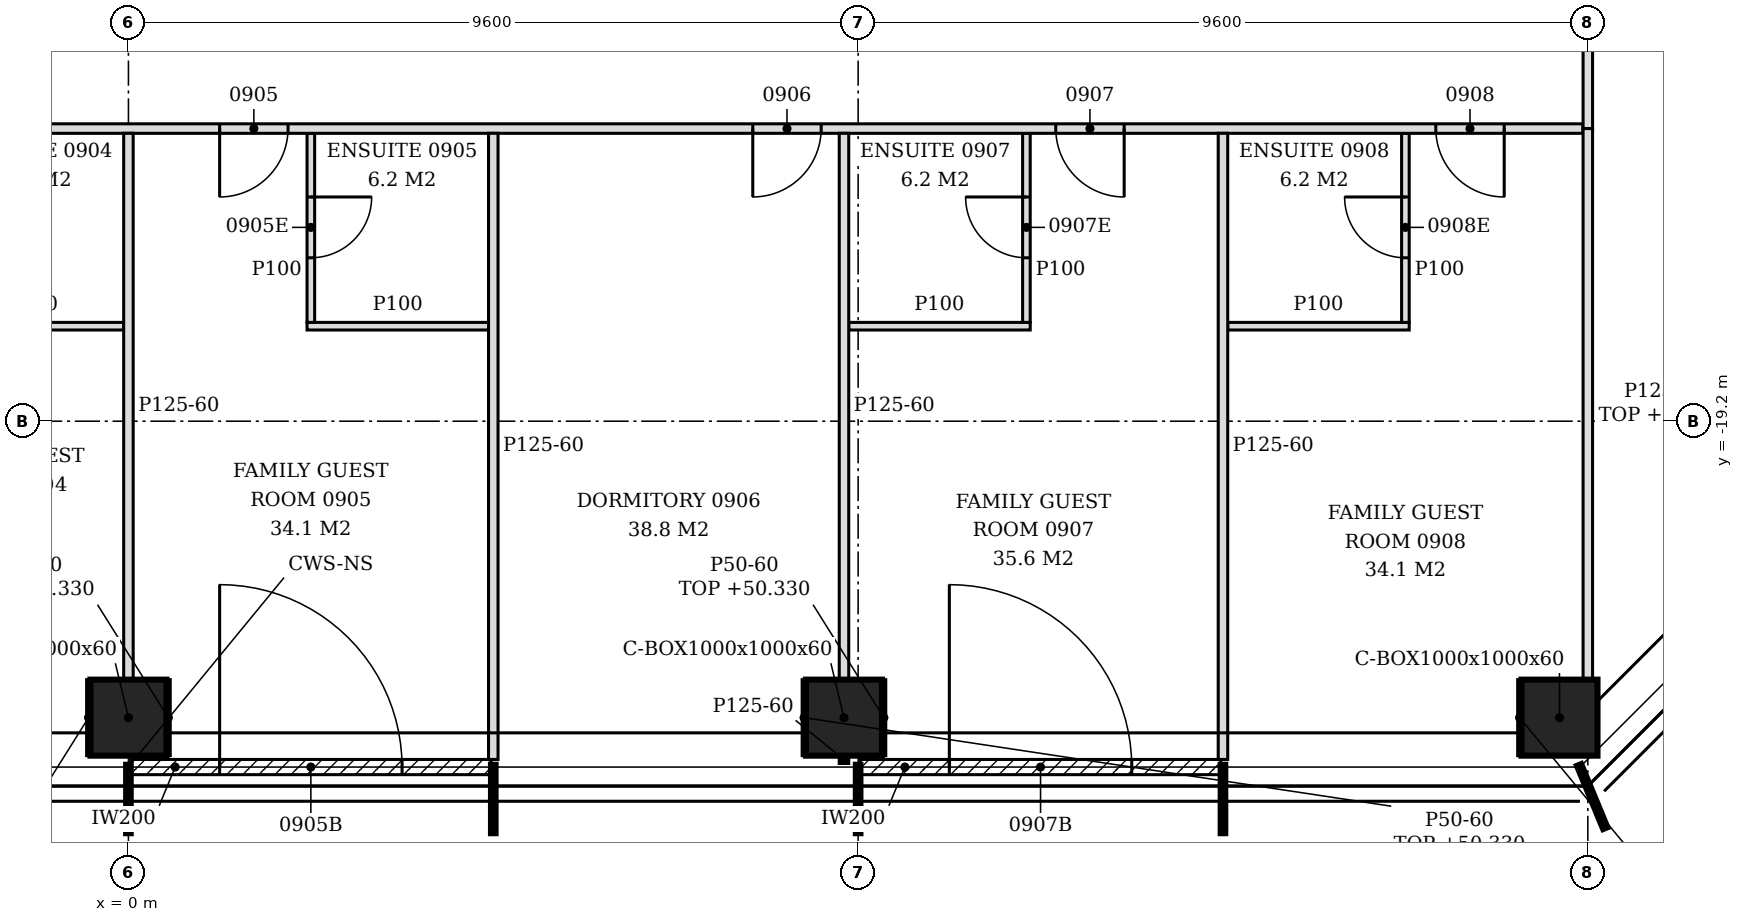
"""IFC4 building model, lengths in metres.
Left out: names, types, materials, properties, quantities, classifications, styles, units other than length and angle.
Written with IfcOpenShell. Run it as: python <this file> out.ifc"""

import sys

from ifc_helpers import new_model, si_unit, direction, frame, frame_2d, origin, origin_2d, place, context, subcontext, project, spatial, polyline, rectangle, hollow_rectangle, outline, extrude, element, fill, save


model = new_model("IFC4")
c1 = context("Model", 3, precision=1e-05, world=origin(), true_north=direction((0.0, 1.0)))
c2 = subcontext(c1, "Body", "Model", "MODEL_VIEW")
j1 = project(units=[si_unit("LENGTHUNIT", "METRE"), si_unit("PLANEANGLEUNIT", "RADIAN")], contexts=[c1])
p1 = place(None, origin())
s1 = spatial("IfcSite", under=j1, at=p1, CompositionType="ELEMENT")
p2 = place(p1, origin())
s2 = spatial("IfcBuilding", under=s1, at=p2, CompositionType="ELEMENT")
p3 = place(p2, frame((0.0, 0.0, 47.4)))
s3 = spatial("IfcBuildingStorey", under=s2, at=p3, CompositionType="ELEMENT", Elevation=47.4)
for number, where, z_axis, x_axis in (
    (1, (0.0, -23.1, -0.15), (0.0, 0.0, 1.0), (1.0, 0.0, 0.0)),
    (2, (9.414, -23.1, -0.15), (0.0, 0.0, 1.0), (1.0, 0.0, 0.0)),
    (3, (18.827, -23.1, -0.15), (0.0, 0.0, 1.0), (1.0, 0.0, 0.0)),
):
    element("IfcColumn", number, at=place(p3, frame(where, z_axis=z_axis, x_axis=x_axis)), inside=s3, PredefinedType="COLUMN", context=c2, shape_type="SweptSolid", body=[
        extrude(hollow_rectangle(XDim=1.0, YDim=1.0, WallThickness=0.06, at=origin_2d()), origin(), (0.0, 0.0, 1.0), 3.6),
    ])
p4 = place(p3, frame((0.03, -23.75, 0.0), z_axis=(0.0, 0.0, 1.0), x_axis=(1.0, 0.0, 0.0)))
e4 = element("IfcWall", 4, at=p4, inside=s3, PredefinedType="NOTDEFINED", context=c2, shape_type="SweptSolid", body=[
    extrude(rectangle(XDim=4.74, YDim=0.2, at=frame_2d((2.37, 0.0))), origin(), (0.0, 0.0, 1.0), 3.45),
])
p5 = place(p4, frame((1.17, 0.0, 0.0)))
e5 = element("IfcOpeningElement", 5, at=p5, cuts=e4, PredefinedType="OPENING", context=c2, shape_type="SweptSolid", body=[
    extrude(rectangle(XDim=2.4, YDim=2.4, at=frame_2d((1.2, 1.2))), frame((0.0, 0.11, 0.0), z_axis=(0.0, -1.0, 0.0), x_axis=(1.0, 0.0, 0.0)), (0.0, 0.0, 1.0), 0.22),
])
p6 = place(p3, frame((9.63, -23.75, 0.0), z_axis=(0.0, 0.0, 1.0), x_axis=(1.0, 0.0, 0.0)))
e6 = element("IfcWall", 6, at=p6, inside=s3, PredefinedType="NOTDEFINED", context=c2, shape_type="SweptSolid", body=[
    extrude(rectangle(XDim=4.74, YDim=0.2, at=frame_2d((2.37, 0.0))), origin(), (0.0, 0.0, 1.0), 3.45),
])
p7 = place(p6, frame((1.17, 0.0, 0.0)))
e7 = element("IfcOpeningElement", 7, at=p7, cuts=e6, PredefinedType="OPENING", context=c2, shape_type="SweptSolid", body=[
    extrude(rectangle(XDim=2.4, YDim=2.4, at=frame_2d((1.2, 1.2))), frame((0.0, 0.11, 0.0), z_axis=(0.0, -1.0, 0.0), x_axis=(1.0, 0.0, 0.0)), (0.0, 0.0, 1.0), 0.22),
])
p8 = place(p3, frame((4.8, -23.65, 0.0), z_axis=(0.0, 0.0, 1.0), x_axis=(0.0, 1.0, 0.0)))
e8 = element("IfcWall", 8, at=p8, inside=s3, PredefinedType="PARTITIONING", context=c2, shape_type="SweptSolid", body=[
    extrude(outline(polyline([(0.0, 0.0), (8.237, 0.0), (8.238, 3.45), (4.555, 3.45), (4.553, 2.88), (4.345, 2.88), (4.343, 3.45), (0.7, 3.45), (0.698, 2.93), (0.4, 2.93), (0.398, 3.45), (0.0, 3.45), (0.0, 0.0)])), frame((0.0, 0.062, 0.0), z_axis=(0.0, -1.0, 0.0), x_axis=(1.0, 0.0, 0.0)), (0.0, 0.0, 1.0), 0.125),
])
p9 = place(p3, frame((9.414, -23.703, 0.0), z_axis=(0.0, 0.0, 1.0), x_axis=(0.0, 1.0, 0.0)))
e9 = element("IfcWall", 9, at=p9, inside=s3, PredefinedType="PARTITIONING", context=c2, shape_type="SweptSolid", body=[
    extrude(rectangle(XDim=0.103, YDim=0.125, at=frame_2d((0.051, 0.0))), origin(), (0.0, 0.0, 1.0), 3.45),
])
p10 = place(p3, frame((14.4, -23.65, 0.0), z_axis=(0.0, 0.0, 1.0), x_axis=(0.0, 1.0, 0.0)))
e10 = element("IfcWall", 10, at=p10, inside=s3, PredefinedType="PARTITIONING", context=c2, shape_type="SweptSolid", body=[
    extrude(outline(polyline([(0.0, 0.0), (8.237, 0.0), (8.238, 3.45), (4.555, 3.45), (4.553, 2.88), (4.345, 2.88), (4.343, 3.45), (0.7, 3.45), (0.698, 2.93), (0.4, 2.93), (0.398, 3.45), (0.0, 3.45), (0.0, 0.0)])), frame((0.0, 0.062, 0.0), z_axis=(0.0, -1.0, 0.0), x_axis=(1.0, 0.0, 0.0)), (0.0, 0.0, 1.0), 0.125),
])
for number, where, z_axis, x_axis in (
    (11, (0.0, -22.6, 0.0), (0.0, 0.0, 1.0), (0.0, 1.0, 0.0)),
    (12, (9.414, -22.6, 0.0), (0.0, 0.0, 1.0), (0.0, 1.0, 0.0)),
):
    element("IfcWall", number, at=place(p3, frame(where, z_axis=z_axis, x_axis=x_axis)), inside=s3, PredefinedType="PARTITIONING", context=c2, shape_type="SweptSolid", body=[
        extrude(outline(polyline([(0.0, 0.0), (7.188, 0.0), (7.188, 3.45), (3.505, 3.45), (3.503, 2.88), (3.295, 2.88), (3.293, 3.45), (0.0, 3.45), (0.0, 0.0)])), frame((0.0, 0.062, 0.0), z_axis=(0.0, -1.0, 0.0), x_axis=(1.0, 0.0, 0.0)), (0.0, 0.0, 1.0), 0.125),
    ])
p11 = place(p3, frame((19.2, -22.6, 0.0), z_axis=(0.0, 0.0, 1.0), x_axis=(0.0, 1.0, 0.0)))
e13 = element("IfcWall", 13, at=p11, inside=s3, PredefinedType="PARTITIONING", context=c2, shape_type="SweptSolid", body=[
    extrude(outline(polyline([(0.0, 0.0), (7.25, 0.0), (7.25, 2.73), (0.43, 2.73), (0.428, 2.63), (0.0, 2.63), (0.0, 0.0)])), frame((0.0, 0.062, 0.0), z_axis=(0.0, -1.0, 0.0), x_axis=(1.0, 0.0, 0.0)), (0.0, 0.0, 1.0), 0.125),
])
for number, where, z_axis, x_axis in (
    (14, (-2.45, -17.95, 0.0), (0.0, 0.0, 1.0), (1.0, 0.0, 0.0)),
    (15, (2.35, -17.95, 0.0), (0.0, 0.0, 1.0), (1.0, 0.0, 0.0)),
):
    element("IfcWall", number, at=place(p3, frame(where, z_axis=z_axis, x_axis=x_axis)), inside=s3, PredefinedType="PARTITIONING", context=c2, shape_type="SweptSolid", body=[
        extrude(rectangle(XDim=2.387, YDim=0.1, at=frame_2d((1.194, 0.0))), origin(), (0.0, 0.0, 1.0), 3.45),
    ])
p12 = place(p3, frame((2.4, -17.9, 0.0), z_axis=(0.0, 0.0, 1.0), x_axis=(0.0, 1.0, 0.0)))
e16 = element("IfcWall", 16, at=p12, inside=s3, PredefinedType="PARTITIONING", context=c2, shape_type="SweptSolid", body=[
    extrude(rectangle(XDim=2.487, YDim=0.1, at=frame_2d((1.244, 0.0))), origin(), (0.0, 0.0, 1.0), 3.45),
])
p13 = place(p12, frame((0.85, 0.0, 0.0)))
e17 = element("IfcOpeningElement", 17, at=p13, cuts=e16, PredefinedType="OPENING", context=c2, shape_type="SweptSolid", body=[
    extrude(rectangle(XDim=0.8, YDim=2.1, at=frame_2d((0.4, 1.05))), frame((0.0, 0.06, 0.0), z_axis=(0.0, -1.0, 0.0), x_axis=(1.0, 0.0, 0.0)), (0.0, 0.0, 1.0), 0.12),
])
p14 = place(p3, frame((9.477, -17.95, 0.0), z_axis=(0.0, 0.0, 1.0), x_axis=(1.0, 0.0, 0.0)))
e18 = element("IfcWall", 18, at=p14, inside=s3, PredefinedType="PARTITIONING", context=c2, shape_type="SweptSolid", body=[
    extrude(rectangle(XDim=2.387, YDim=0.1, at=frame_2d((1.194, 0.0))), origin(), (0.0, 0.0, 1.0), 3.45),
])
p15 = place(p3, frame((11.814, -17.9, 0.0), z_axis=(0.0, 0.0, 1.0), x_axis=(0.0, 1.0, 0.0)))
e19 = element("IfcWall", 19, at=p15, inside=s3, PredefinedType="PARTITIONING", context=c2, shape_type="SweptSolid", body=[
    extrude(rectangle(XDim=2.487, YDim=0.1, at=frame_2d((1.244, 0.0))), origin(), (0.0, 0.0, 1.0), 3.45),
])
p16 = place(p15, frame((0.85, 0.0, 0.0)))
e20 = element("IfcOpeningElement", 20, at=p16, cuts=e19, PredefinedType="OPENING", context=c2, shape_type="SweptSolid", body=[
    extrude(rectangle(XDim=0.8, YDim=2.1, at=frame_2d((0.4, 1.05))), frame((0.0, 0.06, 0.0), z_axis=(0.0, -1.0, 0.0), x_axis=(1.0, 0.0, 0.0)), (0.0, 0.0, 1.0), 0.12),
])
p17 = place(p3, frame((14.462, -17.95, 0.0), z_axis=(0.0, 0.0, 1.0), x_axis=(1.0, 0.0, 0.0)))
e21 = element("IfcWall", 21, at=p17, inside=s3, PredefinedType="PARTITIONING", context=c2, shape_type="SweptSolid", body=[
    extrude(rectangle(XDim=2.388, YDim=0.1, at=frame_2d((1.194, 0.0))), origin(), (0.0, 0.0, 1.0), 3.45),
])
p18 = place(p3, frame((16.8, -17.9, 0.0), z_axis=(0.0, 0.0, 1.0), x_axis=(0.0, 1.0, 0.0)))
e22 = element("IfcWall", 22, at=p18, inside=s3, PredefinedType="PARTITIONING", context=c2, shape_type="SweptSolid", body=[
    extrude(rectangle(XDim=2.487, YDim=0.1, at=frame_2d((1.244, 0.0))), origin(), (0.0, 0.0, 1.0), 3.45),
])
p19 = place(p18, frame((0.85, 0.0, 0.0)))
e23 = element("IfcOpeningElement", 23, at=p19, cuts=e22, PredefinedType="OPENING", context=c2, shape_type="SweptSolid", body=[
    extrude(rectangle(XDim=0.8, YDim=2.1, at=frame_2d((0.4, 1.05))), frame((0.0, 0.06, 0.0), z_axis=(0.0, -1.0, 0.0), x_axis=(1.0, 0.0, 0.0)), (0.0, 0.0, 1.0), 0.12),
])
p20 = place(p3, frame((-20.15, -15.35, 0.0), z_axis=(0.0, 0.0, 1.0), x_axis=(1.0, 0.0, 0.0)))
e24 = element("IfcWall", 24, at=p20, inside=s3, PredefinedType="PARTITIONING", context=c2, shape_type="SweptSolid", body=[
    extrude(outline(polyline([(0.0, 0.0), (39.287, 0.0), (39.288, 2.73), (39.2, 2.73), (39.198, 3.45), (27.5, 3.45), (27.498, 2.73), (27.2, 2.73), (27.198, 3.45), (15.5, 3.45), (15.498, 2.73), (15.2, 2.73), (15.198, 3.45), (5.9, 3.45), (5.898, 2.93), (5.6, 2.93), (5.598, 3.45), (0.0, 3.45), (0.0, 0.0)])), frame((0.0, 0.062, 0.0), z_axis=(0.0, -1.0, 0.0), x_axis=(1.0, 0.0, 0.0)), (0.0, 0.0, 1.0), 0.125),
])
p21 = place(p20, frame((4.55, 0.0, 0.0)))
e25 = element("IfcOpeningElement", 25, at=p21, cuts=e24, PredefinedType="OPENING", context=c2, shape_type="SweptSolid", body=[
    extrude(rectangle(XDim=0.9, YDim=2.1, at=frame_2d((0.45, 1.05))), frame((0.0, 0.073, 0.0), z_axis=(0.0, -1.0, 0.0), x_axis=(1.0, 0.0, 0.0)), (0.0, 0.0, 1.0), 0.145),
])
p22 = place(p20, frame((7.136, 0.0, 0.0)))
e26 = element("IfcOpeningElement", 26, at=p22, cuts=e24, PredefinedType="OPENING", context=c2, shape_type="SweptSolid", body=[
    extrude(rectangle(XDim=0.9, YDim=2.1, at=frame_2d((0.45, 1.05))), frame((0.0, 0.073, 0.0), z_axis=(0.0, -1.0, 0.0), x_axis=(1.0, 0.0, 0.0)), (0.0, 0.0, 1.0), 0.145),
])
p23 = place(p20, frame((14.15, 0.0, 0.0)))
e27 = element("IfcOpeningElement", 27, at=p23, cuts=e24, PredefinedType="OPENING", context=c2, shape_type="SweptSolid", body=[
    extrude(rectangle(XDim=0.9, YDim=2.1, at=frame_2d((0.45, 1.05))), frame((0.0, 0.073, 0.0), z_axis=(0.0, -1.0, 0.0), x_axis=(1.0, 0.0, 0.0)), (0.0, 0.0, 1.0), 0.145),
])
p24 = place(p20, frame((16.55, 0.0, 0.0)))
e28 = element("IfcOpeningElement", 28, at=p24, cuts=e24, PredefinedType="OPENING", context=c2, shape_type="SweptSolid", body=[
    extrude(rectangle(XDim=0.9, YDim=2.1, at=frame_2d((0.45, 1.05))), frame((0.0, 0.073, 0.0), z_axis=(0.0, -1.0, 0.0), x_axis=(1.0, 0.0, 0.0)), (0.0, 0.0, 1.0), 0.145),
])
p25 = place(p20, frame((21.35, 0.0, 0.0)))
e29 = element("IfcOpeningElement", 29, at=p25, cuts=e24, PredefinedType="OPENING", context=c2, shape_type="SweptSolid", body=[
    extrude(rectangle(XDim=0.9, YDim=2.1, at=frame_2d((0.45, 1.05))), frame((0.0, 0.073, 0.0), z_axis=(0.0, -1.0, 0.0), x_axis=(1.0, 0.0, 0.0)), (0.0, 0.0, 1.0), 0.145),
])
p26 = place(p20, frame((28.364, 0.0, 0.0)))
e30 = element("IfcOpeningElement", 30, at=p26, cuts=e24, PredefinedType="OPENING", context=c2, shape_type="SweptSolid", body=[
    extrude(rectangle(XDim=0.9, YDim=2.1, at=frame_2d((0.45, 1.05))), frame((0.0, 0.073, 0.0), z_axis=(0.0, -1.0, 0.0), x_axis=(1.0, 0.0, 0.0)), (0.0, 0.0, 1.0), 0.145),
])
p27 = place(p20, frame((32.35, 0.0, 0.0)))
e31 = element("IfcOpeningElement", 31, at=p27, cuts=e24, PredefinedType="OPENING", context=c2, shape_type="SweptSolid", body=[
    extrude(rectangle(XDim=0.9, YDim=2.1, at=frame_2d((0.45, 1.05))), frame((0.0, 0.073, 0.0), z_axis=(0.0, -1.0, 0.0), x_axis=(1.0, 0.0, 0.0)), (0.0, 0.0, 1.0), 0.145),
])
p28 = place(p20, frame((37.35, 0.0, 0.0)))
e32 = element("IfcOpeningElement", 32, at=p28, cuts=e24, PredefinedType="OPENING", context=c2, shape_type="SweptSolid", body=[
    extrude(rectangle(XDim=0.9, YDim=2.1, at=frame_2d((0.45, 1.05))), frame((0.0, 0.073, 0.0), z_axis=(0.0, -1.0, 0.0), x_axis=(1.0, 0.0, 0.0)), (0.0, 0.0, 1.0), 0.145),
])
p29 = place(p3, frame((19.2, -15.35, 0.0), z_axis=(0.0, 0.0, 1.0), x_axis=(0.0, 1.0, 0.0)))
e33 = element("IfcWall", 33, at=p29, inside=s3, PredefinedType="PARTITIONING", context=c2, shape_type="SweptSolid", body=[
    extrude(rectangle(XDim=6.713, YDim=0.125, at=frame_2d((3.356, 0.0))), origin(), (0.0, 0.0, 1.0), 2.73),
])
p30 = place(p29, frame((4.55, 0.0, 0.0)))
e34 = element("IfcOpeningElement", 34, at=p30, cuts=e33, PredefinedType="OPENING", context=c2, shape_type="SweptSolid", body=[
    extrude(rectangle(XDim=0.9, YDim=2.1, at=frame_2d((0.45, 1.05))), frame((0.0, 0.073, 0.0), z_axis=(0.0, -1.0, 0.0), x_axis=(1.0, 0.0, 0.0)), (0.0, 0.0, 1.0), 0.145),
])
for number, where, z_axis, x_axis in (
    (35, (-0.525, -23.6, 0.0), (0.0, 0.0, 1.0), (0.0, 1.0, 0.0)),
    (36, (0.525, -23.6, 0.0), (0.0, 0.0, 1.0), (0.0, 1.0, 0.0)),
    (37, (8.889, -23.6, 0.0), (0.0, 0.0, 1.0), (0.0, 1.0, 0.0)),
    (38, (9.939, -23.6, 0.0), (0.0, 0.0, 1.0), (0.0, 1.0, 0.0)),
    (39, (18.302, -23.6, 0.0), (0.0, 0.0, 1.0), (0.0, 1.0, 0.0)),
):
    element("IfcWall", number, at=place(p3, frame(where, z_axis=z_axis, x_axis=x_axis)), inside=s3, PredefinedType="PARTITIONING", context=c2, shape_type="SweptSolid", body=[
        extrude(rectangle(XDim=1.0, YDim=0.05, at=frame_2d((0.5, 0.0))), origin(), (0.0, 0.0, 1.0), 2.93),
    ])
p31 = place(p5, origin())
e40 = element("IfcDoor", 40, at=p31, inside=s3, OperationType="SINGLE_SWING_LEFT", PredefinedType="DOOR", context=c2, shape_type="SweptSolid", body=[
    extrude(rectangle(XDim=2.4, YDim=2.4, at=frame_2d((1.2, 1.2))), frame((0.0, 0.025, 0.0), z_axis=(0.0, -1.0, 0.0), x_axis=(1.0, 0.0, 0.0)), (0.0, 0.0, 1.0), 0.05),
])
fill(e5, e40)
p32 = place(p7, origin())
e41 = element("IfcDoor", 41, at=p32, inside=s3, OperationType="SINGLE_SWING_LEFT", PredefinedType="DOOR", context=c2, shape_type="SweptSolid", body=[
    extrude(rectangle(XDim=2.4, YDim=2.4, at=frame_2d((1.2, 1.2))), frame((0.0, 0.025, 0.0), z_axis=(0.0, -1.0, 0.0), x_axis=(1.0, 0.0, 0.0)), (0.0, 0.0, 1.0), 0.05),
])
fill(e7, e41)
p33 = place(p25, frame((0.9, 0.0, 0.0), z_axis=(0.0, 0.0, 1.0), x_axis=(-1.0, 0.0, 0.0)))
e42 = element("IfcDoor", 42, at=p33, inside=s3, OperationType="SINGLE_SWING_RIGHT", PredefinedType="DOOR", context=c2, shape_type="SweptSolid", body=[
    extrude(rectangle(XDim=0.9, YDim=2.1, at=frame_2d((0.45, 1.05))), frame((0.0, 0.025, 0.0), z_axis=(0.0, -1.0, 0.0), x_axis=(1.0, 0.0, 0.0)), (0.0, 0.0, 1.0), 0.05),
])
fill(e29, e42)
p34 = place(p13, frame((0.8, 0.0, 0.0), z_axis=(0.0, 0.0, 1.0), x_axis=(-1.0, 0.0, 0.0)))
e43 = element("IfcDoor", 43, at=p34, inside=s3, OperationType="SINGLE_SWING_LEFT", PredefinedType="DOOR", context=c2, shape_type="SweptSolid", body=[
    extrude(rectangle(XDim=0.8, YDim=2.1, at=frame_2d((0.4, 1.05))), frame((0.0, 0.025, 0.0), z_axis=(0.0, -1.0, 0.0), x_axis=(1.0, 0.0, 0.0)), (0.0, 0.0, 1.0), 0.05),
])
fill(e17, e43)
p35 = place(p26, frame((0.9, 0.0, 0.0), z_axis=(0.0, 0.0, 1.0), x_axis=(-1.0, 0.0, 0.0)))
e44 = element("IfcDoor", 44, at=p35, inside=s3, OperationType="SINGLE_SWING_RIGHT", PredefinedType="DOOR", context=c2, shape_type="SweptSolid", body=[
    extrude(rectangle(XDim=0.9, YDim=2.1, at=frame_2d((0.45, 1.05))), frame((0.0, 0.025, 0.0), z_axis=(0.0, -1.0, 0.0), x_axis=(1.0, 0.0, 0.0)), (0.0, 0.0, 1.0), 0.05),
])
fill(e30, e44)
p36 = place(p27, frame((0.9, 0.0, 0.0), z_axis=(0.0, 0.0, 1.0), x_axis=(-1.0, 0.0, 0.0)))
e45 = element("IfcDoor", 45, at=p36, inside=s3, OperationType="SINGLE_SWING_LEFT", PredefinedType="DOOR", context=c2, shape_type="SweptSolid", body=[
    extrude(rectangle(XDim=0.9, YDim=2.1, at=frame_2d((0.45, 1.05))), frame((0.0, 0.025, 0.0), z_axis=(0.0, -1.0, 0.0), x_axis=(1.0, 0.0, 0.0)), (0.0, 0.0, 1.0), 0.05),
])
fill(e31, e45)
p37 = place(p16, origin())
e46 = element("IfcDoor", 46, at=p37, inside=s3, OperationType="SINGLE_SWING_RIGHT", PredefinedType="DOOR", context=c2, shape_type="SweptSolid", body=[
    extrude(rectangle(XDim=0.8, YDim=2.1, at=frame_2d((0.4, 1.05))), frame((0.0, 0.025, 0.0), z_axis=(0.0, -1.0, 0.0), x_axis=(1.0, 0.0, 0.0)), (0.0, 0.0, 1.0), 0.05),
])
fill(e20, e46)
p38 = place(p28, frame((0.9, 0.0, 0.0), z_axis=(0.0, 0.0, 1.0), x_axis=(-1.0, 0.0, 0.0)))
e47 = element("IfcDoor", 47, at=p38, inside=s3, OperationType="SINGLE_SWING_LEFT", PredefinedType="DOOR", context=c2, shape_type="SweptSolid", body=[
    extrude(rectangle(XDim=0.9, YDim=2.1, at=frame_2d((0.45, 1.05))), frame((0.0, 0.025, 0.0), z_axis=(0.0, -1.0, 0.0), x_axis=(1.0, 0.0, 0.0)), (0.0, 0.0, 1.0), 0.05),
])
fill(e32, e47)
p39 = place(p19, origin())
e48 = element("IfcDoor", 48, at=p39, inside=s3, OperationType="SINGLE_SWING_RIGHT", PredefinedType="DOOR", context=c2, shape_type="SweptSolid", body=[
    extrude(rectangle(XDim=0.8, YDim=2.1, at=frame_2d((0.4, 1.05))), frame((0.0, 0.025, 0.0), z_axis=(0.0, -1.0, 0.0), x_axis=(1.0, 0.0, 0.0)), (0.0, 0.0, 1.0), 0.05),
])
fill(e23, e48)
save(model, sys.argv[1])
